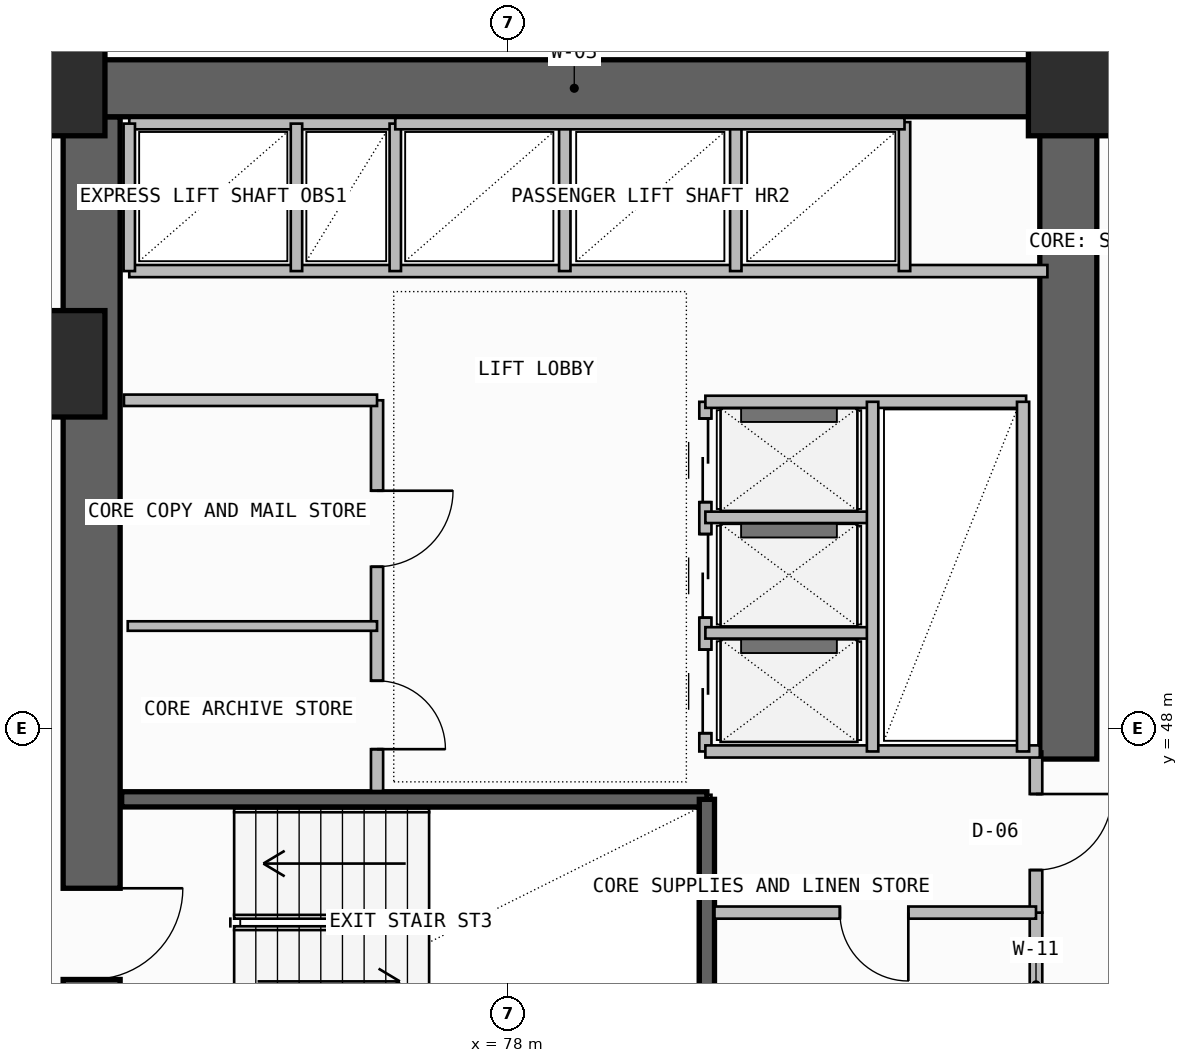
"""IFC4 building model, lengths in metres.
Left out: names, types, materials, properties, quantities, classifications, styles, units other than length and angle.
Written with IfcOpenShell. Run it as: python <this file> out.ifc"""

import sys

from ifc_helpers import new_model, si_unit, direction, frame, frame_2d, origin, origin_2d, place, context, subcontext, project, spatial, rectangle, extrude, element, fill, save


model = new_model("IFC4")
c1 = context("Model", 3, precision=1e-05, world=origin(), true_north=direction((0.0, 1.0)))
c2 = subcontext(c1, "Body", "Model", "MODEL_VIEW")
j1 = project(units=[si_unit("LENGTHUNIT", "METRE"), si_unit("PLANEANGLEUNIT", "RADIAN")], contexts=[c1])
p1 = place(None, origin())
s1 = spatial("IfcSite", under=j1, at=p1, CompositionType="ELEMENT")
p2 = place(p1, origin())
s2 = spatial("IfcBuilding", under=s1, at=p2, CompositionType="ELEMENT")
p3 = place(p2, frame((0.0, 0.0, 179.1)))
s3 = spatial("IfcBuildingStorey", under=s2, at=p3, CompositionType="ELEMENT", Elevation=179.1)
p4 = place(p3, frame((72.525, 43.35, -0.26), z_axis=(0.0, 0.0, 1.0), x_axis=(0.0, 1.0, 0.0)))
e1 = element("IfcWall", 1, at=p4, inside=s3, PredefinedType="SHEAR", context=c2, shape_type="SweptSolid", body=[
    extrude(rectangle(XDim=12.7, YDim=0.75, at=frame_2d((6.35, 0.0))), origin(), (0.0, 0.0, 1.0), 3.52),
])
p5 = place(p4, frame((1.35, 0.0, 0.26)))
e2 = element("IfcOpeningElement", 2, at=p5, cuts=e1, PredefinedType="OPENING", context=c2, shape_type="SweptSolid", body=[
    extrude(rectangle(XDim=1.2, YDim=2.2, at=frame_2d((0.6, 1.1))), frame((0.0, 0.385, 0.0), z_axis=(0.0, -1.0, 0.0), x_axis=(1.0, 0.0, 0.0)), (0.0, 0.0, 1.0), 0.77),
])
p6 = place(p3, frame((72.0, 56.425, -0.26), z_axis=(0.0, 0.0, 1.0), x_axis=(1.0, 0.0, 0.0)))
e3 = element("IfcWall", 3, at=p6, inside=s3, PredefinedType="SHEAR", context=c2, shape_type="SweptSolid", body=[
    extrude(rectangle(XDim=13.75, YDim=0.75, at=frame_2d((6.875, 0.0))), origin(), (0.0, 0.0, 1.0), 3.52),
])
p7 = place(p3, frame((85.375, 47.6, -0.26), z_axis=(0.0, 0.0, 1.0), x_axis=(0.0, 1.0, 0.0)))
e4 = element("IfcWall", 4, at=p7, inside=s3, PredefinedType="SHEAR", context=c2, shape_type="SweptSolid", body=[
    extrude(rectangle(XDim=8.45, YDim=0.75, at=frame_2d((4.225, 0.0))), origin(), (0.0, 0.0, 1.0), 3.52),
])
for number, where, z_axis, x_axis in (
    (5, (72.0, 52.8, 0.0), (0.0, 0.0, 1.0), (1.0, 0.0, 0.0)),
    (6, (72.0, 56.5, 0.0), (0.0, 0.0, 1.0), (1.0, 0.0, 0.0)),
    (7, (85.55, 56.5, 0.0), (0.0, 0.0, 1.0), (1.0, 0.0, 0.0)),
):
    element("IfcColumn", number, at=place(p3, frame(where, z_axis=z_axis, x_axis=x_axis)), inside=s3, PredefinedType="COLUMN", context=c2, shape_type="SweptSolid", body=[
        extrude(rectangle(XDim=1.4, YDim=1.4, at=origin_2d()), origin(), (0.0, 0.0, 1.0), 3.52),
    ])
p8 = place(p3, frame((72.92, 47.07, -0.26), z_axis=(0.0, 0.0, 1.0), x_axis=(1.0, 0.0, 0.0)))
e8 = element("IfcWall", 8, at=p8, inside=s3, PredefinedType="SOLIDWALL", context=c2, shape_type="SweptSolid", body=[
    extrude(rectangle(XDim=7.7, YDim=0.2, at=frame_2d((3.85, 0.0))), origin(), (0.0, 0.0, 1.0), 3.52),
])
p9 = place(p3, frame((80.62, 43.83, -0.26), z_axis=(0.0, 0.0, 1.0), x_axis=(0.0, 1.0, 0.0)))
e9 = element("IfcWall", 9, at=p9, inside=s3, PredefinedType="SOLIDWALL", context=c2, shape_type="SweptSolid", body=[
    extrude(rectangle(XDim=3.24, YDim=0.2, at=frame_2d((1.62, 0.0))), origin(), (0.0, 0.0, 1.0), 3.52),
])
p10 = place(p3, frame((84.95, 43.68, 0.0), z_axis=(0.0, 0.0, 1.0), x_axis=(0.0, 1.0, 0.0)))
e10 = element("IfcWall", 10, at=p10, inside=s3, PredefinedType="PLUMBINGWALL", context=c2, shape_type="SweptSolid", body=[
    extrude(rectangle(XDim=1.9, YDim=0.165, at=frame_2d((0.95, 0.0))), origin(), (0.0, 0.0, 1.0), 3.26),
])
p11 = place(p3, frame((84.95, 45.58, 0.0), z_axis=(0.0, 0.0, 1.0), x_axis=(0.0, 1.0, 0.0)))
e11 = element("IfcWall", 11, at=p11, inside=s3, PredefinedType="PARTITIONING", context=c2, shape_type="SweptSolid", body=[
    extrude(rectangle(XDim=2.12, YDim=0.165, at=frame_2d((1.06, 0.0))), origin(), (0.0, 0.0, 1.0), 3.26),
])
p12 = place(p11, frame((0.56, 0.0, 0.0)))
e12 = element("IfcOpeningElement", 12, at=p12, cuts=e11, PredefinedType="OPENING", context=c2, shape_type="SweptSolid", body=[
    extrude(rectangle(XDim=1.0, YDim=2.2, at=frame_2d((0.5, 1.1))), frame((0.0, 0.093, 0.0), z_axis=(0.0, -1.0, 0.0), x_axis=(1.0, 0.0, 0.0)), (0.0, 0.0, 1.0), 0.185),
])
p13 = place(p3, frame((80.72, 45.58, 0.0), z_axis=(0.0, 0.0, 1.0), x_axis=(1.0, 0.0, 0.0)))
e13 = element("IfcWall", 13, at=p13, inside=s3, PredefinedType="PLUMBINGWALL", context=c2, shape_type="SweptSolid", body=[
    extrude(rectangle(XDim=4.23, YDim=0.16, at=frame_2d((2.115, 0.0))), origin(), (0.0, 0.0, 1.0), 3.26),
])
p14 = place(p13, frame((1.65, 0.0, 0.0)))
e14 = element("IfcOpeningElement", 14, at=p14, cuts=e13, PredefinedType="OPENING", context=c2, shape_type="SweptSolid", body=[
    extrude(rectangle(XDim=0.9, YDim=2.1, at=frame_2d((0.45, 1.05))), frame((0.0, 0.09, 0.0), z_axis=(0.0, -1.0, 0.0), x_axis=(1.0, 0.0, 0.0)), (0.0, 0.0, 1.0), 0.18),
])
p15 = place(p3, frame((76.28, 47.18, 0.0), z_axis=(0.0, 0.0, 1.0), x_axis=(0.0, 1.0, 0.0)))
e15 = element("IfcWall", 15, at=p15, inside=s3, PredefinedType="SOLIDWALL", context=c2, shape_type="SweptSolid", body=[
    extrude(rectangle(XDim=5.14, YDim=0.16, at=frame_2d((2.57, 0.0))), origin(), (0.0, 0.0, 1.0), 3.26),
])
p16 = place(p15, frame((0.55, 0.0, 0.0)))
e16 = element("IfcOpeningElement", 16, at=p16, cuts=e15, PredefinedType="OPENING", context=c2, shape_type="SweptSolid", body=[
    extrude(rectangle(XDim=0.9, YDim=2.1, at=frame_2d((0.45, 1.05))), frame((0.0, 0.09, 0.0), z_axis=(0.0, -1.0, 0.0), x_axis=(1.0, 0.0, 0.0)), (0.0, 0.0, 1.0), 0.18),
])
p17 = place(p15, frame((2.95, 0.0, 0.0)))
e17 = element("IfcOpeningElement", 17, at=p17, cuts=e15, PredefinedType="OPENING", context=c2, shape_type="SweptSolid", body=[
    extrude(rectangle(XDim=1.0, YDim=2.2, at=frame_2d((0.5, 1.1))), frame((0.0, 0.09, 0.0), z_axis=(0.0, -1.0, 0.0), x_axis=(1.0, 0.0, 0.0)), (0.0, 0.0, 1.0), 0.18),
])
p18 = place(p3, frame((72.95, 52.32, 0.0), z_axis=(0.0, 0.0, 1.0), x_axis=(1.0, 0.0, 0.0)))
e18 = element("IfcWall", 18, at=p18, inside=s3, PredefinedType="SOLIDWALL", context=c2, shape_type="SweptSolid", body=[
    extrude(rectangle(XDim=3.33, YDim=0.15, at=frame_2d((1.665, 0.0))), origin(), (0.0, 0.0, 1.0), 3.26),
])
p19 = place(p3, frame((73.0, 49.35, 0.0), z_axis=(0.0, 0.0, 1.0), x_axis=(1.0, 0.0, 0.0)))
e19 = element("IfcWall", 19, at=p19, inside=s3, PredefinedType="PARTITIONING", context=c2, shape_type="SweptSolid", body=[
    extrude(rectangle(XDim=3.28, YDim=0.125, at=frame_2d((1.64, 0.0))), origin(), (0.0, 0.0, 1.0), 3.26),
])
p20 = place(p3, frame((80.6, 47.7, 0.0), z_axis=(0.0, 0.0, 1.0), x_axis=(0.0, 1.0, 0.0)))
e20 = element("IfcWall", 20, at=p20, inside=s3, PredefinedType="SOLIDWALL", context=c2, shape_type="SweptSolid", body=[
    extrude(rectangle(XDim=4.6, YDim=0.16, at=frame_2d((2.3, 0.0))), origin(), (0.0, 0.0, 1.0), 3.26),
])
p21 = place(p20, frame((0.24, 0.0, 0.0)))
e21 = element("IfcOpeningElement", 21, at=p21, cuts=e20, PredefinedType="OPENING", context=c2, shape_type="SweptSolid", body=[
    extrude(rectangle(XDim=1.1, YDim=2.25, at=frame_2d((0.55, 1.125))), frame((0.0, 0.09, 0.0), z_axis=(0.0, -1.0, 0.0), x_axis=(1.0, 0.0, 0.0)), (0.0, 0.0, 1.0), 0.18),
])
p22 = place(p20, frame((1.76, 0.0, 0.0)))
e22 = element("IfcOpeningElement", 22, at=p22, cuts=e20, PredefinedType="OPENING", context=c2, shape_type="SweptSolid", body=[
    extrude(rectangle(XDim=1.1, YDim=2.25, at=frame_2d((0.55, 1.125))), frame((0.0, 0.09, 0.0), z_axis=(0.0, -1.0, 0.0), x_axis=(1.0, 0.0, 0.0)), (0.0, 0.0, 1.0), 0.18),
])
p23 = place(p20, frame((3.28, 0.0, 0.0)))
e23 = element("IfcOpeningElement", 23, at=p23, cuts=e20, PredefinedType="OPENING", context=c2, shape_type="SweptSolid", body=[
    extrude(rectangle(XDim=1.1, YDim=2.25, at=frame_2d((0.55, 1.125))), frame((0.0, 0.09, 0.0), z_axis=(0.0, -1.0, 0.0), x_axis=(1.0, 0.0, 0.0)), (0.0, 0.0, 1.0), 0.18),
])
p24 = place(p3, frame((80.6, 47.7, 0.0), z_axis=(0.0, 0.0, 1.0), x_axis=(1.0, 0.0, 0.0)))
e24 = element("IfcWall", 24, at=p24, inside=s3, PredefinedType="SOLIDWALL", context=c2, shape_type="SweptSolid", body=[
    extrude(rectangle(XDim=4.4, YDim=0.16, at=frame_2d((2.2, 0.0))), origin(), (0.0, 0.0, 1.0), 3.26),
])
p25 = place(p3, frame((80.6, 52.3, 0.0), z_axis=(0.0, 0.0, 1.0), x_axis=(1.0, 0.0, 0.0)))
e25 = element("IfcWall", 25, at=p25, inside=s3, PredefinedType="SOLIDWALL", context=c2, shape_type="SweptSolid", body=[
    extrude(rectangle(XDim=4.22, YDim=0.16, at=frame_2d((2.11, 0.0))), origin(), (0.0, 0.0, 1.0), 3.26),
])
for number, where, z_axis, x_axis in (
    (26, (80.6, 49.26, 0.0), (0.0, 0.0, 1.0), (1.0, 0.0, 0.0)),
    (27, (80.6, 50.78, 0.0), (0.0, 0.0, 1.0), (1.0, 0.0, 0.0)),
):
    element("IfcWall", number, at=place(p3, frame(where, z_axis=z_axis, x_axis=x_axis)), inside=s3, PredefinedType="PLUMBINGWALL", context=c2, shape_type="SweptSolid", body=[
        extrude(rectangle(XDim=2.2, YDim=0.15, at=frame_2d((1.1, 0.0))), origin(), (0.0, 0.0, 1.0), 3.26),
    ])
p26 = place(p3, frame((82.8, 47.7, 0.0), z_axis=(0.0, 0.0, 1.0), x_axis=(0.0, 1.0, 0.0)))
e28 = element("IfcWall", 28, at=p26, inside=s3, PredefinedType="PLUMBINGWALL", context=c2, shape_type="SweptSolid", body=[
    extrude(rectangle(XDim=4.6, YDim=0.15, at=frame_2d((2.3, 0.0))), origin(), (0.0, 0.0, 1.0), 3.26),
])
p27 = place(p3, frame((84.78, 47.7, 0.0), z_axis=(0.0, 0.0, 1.0), x_axis=(0.0, 1.0, 0.0)))
e29 = element("IfcWall", 29, at=p27, inside=s3, PredefinedType="SOLIDWALL", context=c2, shape_type="SweptSolid", body=[
    extrude(rectangle(XDim=4.6, YDim=0.16, at=frame_2d((2.3, 0.0))), origin(), (0.0, 0.0, 1.0), 3.26),
])
p28 = place(p3, frame((73.02, 54.02, 0.0), z_axis=(0.0, 0.0, 1.0), x_axis=(1.0, 0.0, 0.0)))
e30 = element("IfcWall", 30, at=p28, inside=s3, PredefinedType="SOLIDWALL", context=c2, shape_type="SweptSolid", body=[
    extrude(rectangle(XDim=12.08, YDim=0.16, at=frame_2d((6.04, 0.0))), origin(), (0.0, 0.0, 1.0), 3.26),
])
p29 = place(p3, frame((73.02, 55.96, 0.0), z_axis=(0.0, 0.0, 1.0), x_axis=(1.0, 0.0, 0.0)))
e31 = element("IfcWall", 31, at=p29, inside=s3, PredefinedType="SOLIDWALL", context=c2, shape_type="SweptSolid", body=[
    extrude(rectangle(XDim=3.5, YDim=0.15, at=frame_2d((1.75, 0.0))), origin(), (0.0, 0.0, 1.0), 3.26),
])
p30 = place(p3, frame((73.02, 54.02, 0.0), z_axis=(0.0, 0.0, 1.0), x_axis=(0.0, 1.0, 0.0)))
e32 = element("IfcWall", 32, at=p30, inside=s3, PredefinedType="PLUMBINGWALL", context=c2, shape_type="SweptSolid", body=[
    extrude(rectangle(XDim=1.94, YDim=0.15, at=frame_2d((0.97, 0.0))), origin(), (0.0, 0.0, 1.0), 3.26),
])
p31 = place(p3, frame((76.52, 54.02, 0.0), z_axis=(0.0, 0.0, 1.0), x_axis=(0.0, 1.0, 0.0)))
e33 = element("IfcWall", 33, at=p31, inside=s3, PredefinedType="SOLIDWALL", context=c2, shape_type="SweptSolid", body=[
    extrude(rectangle(XDim=1.94, YDim=0.15, at=frame_2d((0.97, 0.0))), origin(), (0.0, 0.0, 1.0), 3.26),
])
p32 = place(p3, frame((75.22, 54.02, 0.0), z_axis=(0.0, 0.0, 1.0), x_axis=(0.0, 1.0, 0.0)))
e34 = element("IfcWall", 34, at=p32, inside=s3, PredefinedType="PLUMBINGWALL", context=c2, shape_type="SweptSolid", body=[
    extrude(rectangle(XDim=1.94, YDim=0.15, at=frame_2d((0.97, 0.0))), origin(), (0.0, 0.0, 1.0), 3.26),
])
for number, where, z_axis, x_axis in (
    (35, (78.75, 54.02, 0.0), (0.0, 0.0, 1.0), (0.0, 1.0, 0.0)),
    (36, (81.0, 54.02, 0.0), (0.0, 0.0, 1.0), (0.0, 1.0, 0.0)),
):
    element("IfcWall", number, at=place(p3, frame(where, z_axis=z_axis, x_axis=x_axis)), inside=s3, PredefinedType="PLUMBINGWALL", context=c2, shape_type="SweptSolid", body=[
        extrude(rectangle(XDim=1.96, YDim=0.15, at=frame_2d((0.98, 0.0))), origin(), (0.0, 0.0, 1.0), 3.26),
    ])
p33 = place(p3, frame((83.22, 54.02, 0.0), z_axis=(0.0, 0.0, 1.0), x_axis=(0.0, 1.0, 0.0)))
e37 = element("IfcWall", 37, at=p33, inside=s3, PredefinedType="SOLIDWALL", context=c2, shape_type="SweptSolid", body=[
    extrude(rectangle(XDim=1.96, YDim=0.15, at=frame_2d((0.98, 0.0))), origin(), (0.0, 0.0, 1.0), 3.26),
])
p34 = place(p3, frame((76.52, 55.96, 0.0), z_axis=(0.0, 0.0, 1.0), x_axis=(1.0, 0.0, 0.0)))
e38 = element("IfcWall", 38, at=p34, inside=s3, PredefinedType="SOLIDWALL", context=c2, shape_type="SweptSolid", body=[
    extrude(rectangle(XDim=6.7, YDim=0.15, at=frame_2d((3.35, 0.0))), origin(), (0.0, 0.0, 1.0), 3.26),
])
p35 = place(p5, frame((1.2, 0.0, 0.0), z_axis=(0.0, 0.0, 1.0), x_axis=(-1.0, 0.0, 0.0)))
e39 = element("IfcDoor", 39, at=p35, inside=s3, OperationType="SINGLE_SWING_LEFT", PredefinedType="USERDEFINED", context=c2, shape_type="SweptSolid", body=[
    extrude(rectangle(XDim=1.2, YDim=2.2, at=frame_2d((0.6, 1.1))), frame((0.0, 0.025, 0.0), z_axis=(0.0, -1.0, 0.0), x_axis=(1.0, 0.0, 0.0)), (0.0, 0.0, 1.0), 0.05),
])
fill(e2, e39)
p36 = place(p12, frame((1.0, 0.0, 0.0), z_axis=(0.0, 0.0, 1.0), x_axis=(-1.0, 0.0, 0.0)))
e40 = element("IfcDoor", 40, at=p36, inside=s3, OperationType="SINGLE_SWING_LEFT", PredefinedType="DOOR", context=c2, shape_type="SweptSolid", body=[
    extrude(rectangle(XDim=1.0, YDim=2.2, at=frame_2d((0.5, 1.1))), frame((0.0, 0.025, 0.0), z_axis=(0.0, -1.0, 0.0), x_axis=(1.0, 0.0, 0.0)), (0.0, 0.0, 1.0), 0.05),
])
fill(e12, e40)
p37 = place(p14, frame((0.9, 0.0, 0.0), z_axis=(0.0, 0.0, 1.0), x_axis=(-1.0, 0.0, 0.0)))
e41 = element("IfcDoor", 41, at=p37, inside=s3, OperationType="SINGLE_SWING_LEFT", PredefinedType="DOOR", context=c2, shape_type="SweptSolid", body=[
    extrude(rectangle(XDim=0.9, YDim=2.1, at=frame_2d((0.45, 1.05))), frame((0.0, 0.025, 0.0), z_axis=(0.0, -1.0, 0.0), x_axis=(1.0, 0.0, 0.0)), (0.0, 0.0, 1.0), 0.05),
])
fill(e14, e41)
p38 = place(p16, frame((0.9, 0.0, 0.0), z_axis=(0.0, 0.0, 1.0), x_axis=(-1.0, 0.0, 0.0)))
e42 = element("IfcDoor", 42, at=p38, inside=s3, OperationType="SINGLE_SWING_RIGHT", PredefinedType="DOOR", context=c2, shape_type="SweptSolid", body=[
    extrude(rectangle(XDim=0.9, YDim=2.1, at=frame_2d((0.45, 1.05))), frame((0.0, 0.025, 0.0), z_axis=(0.0, -1.0, 0.0), x_axis=(1.0, 0.0, 0.0)), (0.0, 0.0, 1.0), 0.05),
])
fill(e16, e42)
p39 = place(p17, frame((1.0, 0.0, 0.0), z_axis=(0.0, 0.0, 1.0), x_axis=(-1.0, 0.0, 0.0)))
e43 = element("IfcDoor", 43, at=p39, inside=s3, OperationType="SINGLE_SWING_LEFT", PredefinedType="DOOR", context=c2, shape_type="SweptSolid", body=[
    extrude(rectangle(XDim=1.0, YDim=2.2, at=frame_2d((0.5, 1.1))), frame((0.0, 0.025, 0.0), z_axis=(0.0, -1.0, 0.0), x_axis=(1.0, 0.0, 0.0)), (0.0, 0.0, 1.0), 0.05),
])
fill(e17, e43)
p40 = place(p21, frame((1.1, 0.0, 0.0), z_axis=(0.0, 0.0, 1.0), x_axis=(-1.0, 0.0, 0.0)))
e44 = element("IfcDoor", 44, at=p40, inside=s3, OperationType="DOUBLE_DOOR_SLIDING", PredefinedType="DOOR", context=c2, shape_type="SweptSolid", body=[
    extrude(rectangle(XDim=1.1, YDim=2.25, at=frame_2d((0.55, 1.125))), frame((0.0, 0.025, 0.0), z_axis=(0.0, -1.0, 0.0), x_axis=(1.0, 0.0, 0.0)), (0.0, 0.0, 1.0), 0.05),
])
fill(e21, e44)
p41 = place(p22, frame((1.1, 0.0, 0.0), z_axis=(0.0, 0.0, 1.0), x_axis=(-1.0, 0.0, 0.0)))
e45 = element("IfcDoor", 45, at=p41, inside=s3, OperationType="DOUBLE_DOOR_SLIDING", PredefinedType="DOOR", context=c2, shape_type="SweptSolid", body=[
    extrude(rectangle(XDim=1.1, YDim=2.25, at=frame_2d((0.55, 1.125))), frame((0.0, 0.025, 0.0), z_axis=(0.0, -1.0, 0.0), x_axis=(1.0, 0.0, 0.0)), (0.0, 0.0, 1.0), 0.05),
])
fill(e22, e45)
p42 = place(p23, frame((1.1, 0.0, 0.0), z_axis=(0.0, 0.0, 1.0), x_axis=(-1.0, 0.0, 0.0)))
e46 = element("IfcDoor", 46, at=p42, inside=s3, OperationType="DOUBLE_DOOR_SLIDING", PredefinedType="DOOR", context=c2, shape_type="SweptSolid", body=[
    extrude(rectangle(XDim=1.1, YDim=2.25, at=frame_2d((0.55, 1.125))), frame((0.0, 0.025, 0.0), z_axis=(0.0, -1.0, 0.0), x_axis=(1.0, 0.0, 0.0)), (0.0, 0.0, 1.0), 0.05),
])
fill(e23, e46)
save(model, sys.argv[1])
